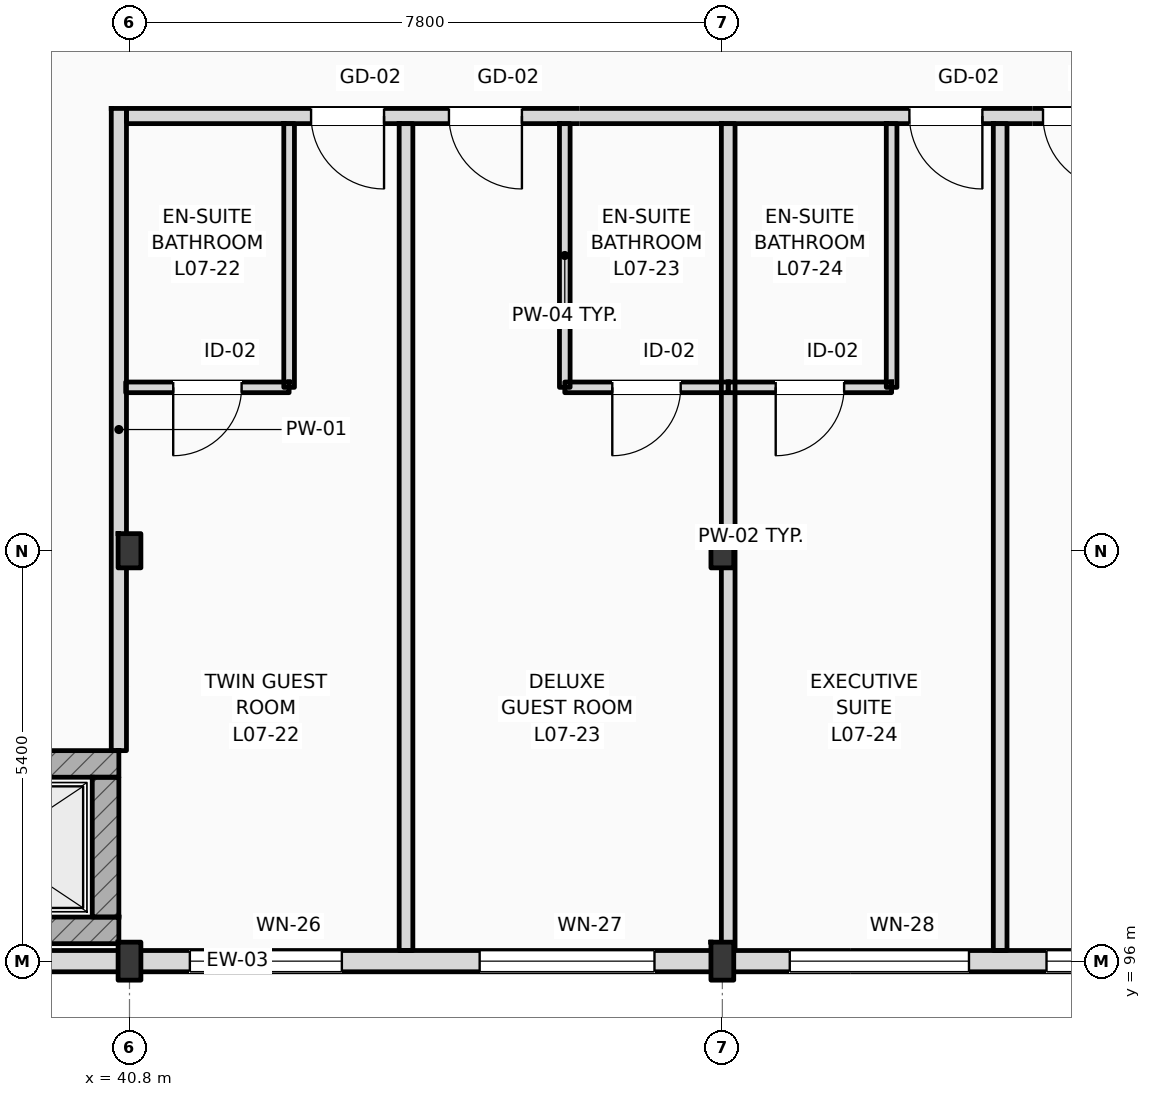
"""IFC4 building model, lengths in metres.
Left out: names, types, materials, properties, quantities, classifications, styles, units other than length and angle.
Written with IfcOpenShell. Run it as: python <this file> out.ifc"""

import sys

from ifc_helpers import new_model, si_unit, direction, frame, frame_2d, origin, origin_2d, place, context, subcontext, project, spatial, rectangle, i_section, extrude, element, fill, save


model = new_model("IFC4")
c1 = context("Model", 3, precision=1e-05, world=origin(), true_north=direction((0.0, 1.0)))
c2 = subcontext(c1, "Body", "Model", "MODEL_VIEW")
j1 = project(units=[si_unit("LENGTHUNIT", "METRE"), si_unit("PLANEANGLEUNIT", "RADIAN")], contexts=[c1])
p1 = place(None, origin())
s1 = spatial("IfcSite", under=j1, at=p1, CompositionType="ELEMENT")
p2 = place(p1, origin())
s2 = spatial("IfcBuilding", under=s1, at=p2, CompositionType="ELEMENT")
p3 = place(p2, frame((0.0, 0.0, 31.8)))
s3 = spatial("IfcBuildingStorey", under=s2, at=p3, CompositionType="ELEMENT", Elevation=31.8)
p4 = place(p3, frame((40.8, 96.0, 0.0), z_axis=(0.0, 0.0, 1.0), x_axis=(1.0, 0.0, 0.0)))
e1 = element("IfcColumn", 1, at=p4, inside=s3, PredefinedType="COLUMN", context=c2, shape_type="SweptSolid", body=[
    extrude(i_section(OverallWidth=0.3, OverallDepth=0.5, WebThickness=0.014, FlangeThickness=0.028, FilletRadius=0.027, at=origin_2d()), origin(), (0.0, 0.0, 1.0), 3.6),
])
p5 = place(p3, frame((40.8, 101.4, 0.0), z_axis=(0.0, 0.0, 1.0), x_axis=(1.0, 0.0, 0.0)))
e2 = element("IfcColumn", 2, at=p5, inside=s3, PredefinedType="COLUMN", context=c2, shape_type="SweptSolid", body=[
    extrude(i_section(OverallWidth=0.3, OverallDepth=0.45, WebThickness=0.014, FlangeThickness=0.026, FilletRadius=0.027, at=origin_2d()), origin(), (0.0, 0.0, 1.0), 3.6),
])
p6 = place(p3, frame((48.6, 96.0, 0.0), z_axis=(0.0, 0.0, 1.0), x_axis=(1.0, 0.0, 0.0)))
e3 = element("IfcColumn", 3, at=p6, inside=s3, PredefinedType="COLUMN", context=c2, shape_type="SweptSolid", body=[
    extrude(i_section(OverallWidth=0.3, OverallDepth=0.5, WebThickness=0.014, FlangeThickness=0.028, FilletRadius=0.027, at=origin_2d()), origin(), (0.0, 0.0, 1.0), 3.6),
])
p7 = place(p3, frame((48.6, 101.4, 0.0), z_axis=(0.0, 0.0, 1.0), x_axis=(1.0, 0.0, 0.0)))
e4 = element("IfcColumn", 4, at=p7, inside=s3, PredefinedType="COLUMN", context=c2, shape_type="SweptSolid", body=[
    extrude(i_section(OverallWidth=0.3, OverallDepth=0.45, WebThickness=0.014, FlangeThickness=0.026, FilletRadius=0.027, at=origin_2d()), origin(), (0.0, 0.0, 1.0), 3.6),
])
p8 = place(p3, frame((25.2, 96.0, 0.0), z_axis=(0.0, 0.0, 1.0), x_axis=(1.0, 0.0, 0.0)))
e5 = element("IfcWall", 5, at=p8, inside=s3, PredefinedType="STANDARD", context=c2, shape_type="SweptSolid", body=[
    extrude(rectangle(XDim=94.8, YDim=0.28, at=frame_2d((47.4, 0.0))), origin(), (0.0, 0.0, 1.0), 2.72),
])
p9 = place(p8, frame((16.394, 0.0, 0.9)))
e6 = element("IfcOpeningElement", 6, at=p9, cuts=e5, PredefinedType="OPENING", context=c2, shape_type="SweptSolid", body=[
    extrude(rectangle(XDim=2.0, YDim=1.64, at=frame_2d((1.0, 0.82))), frame((0.0, 0.15, 0.0), z_axis=(0.0, -1.0, 0.0), x_axis=(1.0, 0.0, 0.0)), (0.0, 0.0, 1.0), 0.3),
])
p10 = place(p8, frame((20.207, 0.0, 0.9)))
e7 = element("IfcOpeningElement", 7, at=p10, cuts=e5, PredefinedType="OPENING", context=c2, shape_type="SweptSolid", body=[
    extrude(rectangle(XDim=2.3, YDim=1.64, at=frame_2d((1.15, 0.82))), frame((0.0, 0.15, 0.0), z_axis=(0.0, -1.0, 0.0), x_axis=(1.0, 0.0, 0.0)), (0.0, 0.0, 1.0), 0.3),
])
p11 = place(p8, frame((24.287, 0.0, 0.9)))
e8 = element("IfcOpeningElement", 8, at=p11, cuts=e5, PredefinedType="OPENING", context=c2, shape_type="SweptSolid", body=[
    extrude(rectangle(XDim=2.358, YDim=1.64, at=frame_2d((1.179, 0.82))), frame((0.0, 0.15, 0.0), z_axis=(0.0, -1.0, 0.0), x_axis=(1.0, 0.0, 0.0)), (0.0, 0.0, 1.0), 0.3),
])
p12 = place(p8, frame((27.665, 0.0, 0.9)))
e9 = element("IfcOpeningElement", 9, at=p12, cuts=e5, PredefinedType="OPENING", context=c2, shape_type="SweptSolid", body=[
    extrude(rectangle(XDim=1.8, YDim=1.64, at=frame_2d((0.9, 0.82))), frame((0.0, 0.15, 0.0), z_axis=(0.0, -1.0, 0.0), x_axis=(1.0, 0.0, 0.0)), (0.0, 0.0, 1.0), 0.3),
])
p13 = place(p8, frame((32.103, 0.0, 0.9)))
e10 = element("IfcOpeningElement", 10, at=p13, cuts=e5, PredefinedType="OPENING", context=c2, shape_type="SweptSolid", body=[
    extrude(rectangle(XDim=2.359, YDim=1.64, at=frame_2d((1.179, 0.82))), frame((0.0, 0.15, 0.0), z_axis=(0.0, -1.0, 0.0), x_axis=(1.0, 0.0, 0.0)), (0.0, 0.0, 1.0), 0.3),
])
p14 = place(p8, frame((36.336, 0.0, 0.9)))
e11 = element("IfcOpeningElement", 11, at=p14, cuts=e5, PredefinedType="OPENING", context=c2, shape_type="SweptSolid", body=[
    extrude(rectangle(XDim=1.2, YDim=1.64, at=frame_2d((0.6, 0.82))), frame((0.0, 0.15, 0.0), z_axis=(0.0, -1.0, 0.0), x_axis=(1.0, 0.0, 0.0)), (0.0, 0.0, 1.0), 0.3),
])
p15 = place(p8, frame((56.177, 0.0, 0.9)))
e12 = element("IfcOpeningElement", 12, at=p15, cuts=e5, PredefinedType="OPENING", context=c2, shape_type="SweptSolid", body=[
    extrude(rectangle(XDim=1.35, YDim=1.64, at=frame_2d((0.675, 0.82))), frame((0.0, 0.15, 0.0), z_axis=(0.0, -1.0, 0.0), x_axis=(1.0, 0.0, 0.0)), (0.0, 0.0, 1.0), 0.3),
])
p16 = place(p8, frame((60.086, 0.0, 0.9)))
e13 = element("IfcOpeningElement", 13, at=p16, cuts=e5, PredefinedType="OPENING", context=c2, shape_type="SweptSolid", body=[
    extrude(rectangle(XDim=1.5, YDim=1.64, at=frame_2d((0.75, 0.82))), frame((0.0, 0.15, 0.0), z_axis=(0.0, -1.0, 0.0), x_axis=(1.0, 0.0, 0.0)), (0.0, 0.0, 1.0), 0.3),
])
p17 = place(p8, frame((64.838, 0.0, 0.9)))
e14 = element("IfcOpeningElement", 14, at=p17, cuts=e5, PredefinedType="OPENING", context=c2, shape_type="SweptSolid", body=[
    extrude(rectangle(XDim=1.65, YDim=1.64, at=frame_2d((0.825, 0.82))), frame((0.0, 0.15, 0.0), z_axis=(0.0, -1.0, 0.0), x_axis=(1.0, 0.0, 0.0)), (0.0, 0.0, 1.0), 0.3),
])
p18 = place(p8, frame((68.419, 0.0, 0.9)))
e15 = element("IfcOpeningElement", 15, at=p18, cuts=e5, PredefinedType="OPENING", context=c2, shape_type="SweptSolid", body=[
    extrude(rectangle(XDim=0.9, YDim=1.64, at=frame_2d((0.45, 0.82))), frame((0.0, 0.15, 0.0), z_axis=(0.0, -1.0, 0.0), x_axis=(1.0, 0.0, 0.0)), (0.0, 0.0, 1.0), 0.3),
])
p19 = place(p8, frame((73.544, 0.0, 0.9)))
e16 = element("IfcOpeningElement", 16, at=p19, cuts=e5, PredefinedType="OPENING", context=c2, shape_type="SweptSolid", body=[
    extrude(rectangle(XDim=1.95, YDim=1.64, at=frame_2d((0.975, 0.82))), frame((0.0, 0.15, 0.0), z_axis=(0.0, -1.0, 0.0), x_axis=(1.0, 0.0, 0.0)), (0.0, 0.0, 1.0), 0.3),
])
p20 = place(p8, frame((78.897, 0.0, 0.9)))
e17 = element("IfcOpeningElement", 17, at=p20, cuts=e5, PredefinedType="OPENING", context=c2, shape_type="SweptSolid", body=[
    extrude(rectangle(XDim=1.35, YDim=1.64, at=frame_2d((0.675, 0.82))), frame((0.0, 0.15, 0.0), z_axis=(0.0, -1.0, 0.0), x_axis=(1.0, 0.0, 0.0)), (0.0, 0.0, 1.0), 0.3),
])
p21 = place(p8, frame((82.249, 0.0, 0.9)))
e18 = element("IfcOpeningElement", 18, at=p21, cuts=e5, PredefinedType="OPENING", context=c2, shape_type="SweptSolid", body=[
    extrude(rectangle(XDim=2.25, YDim=1.64, at=frame_2d((1.125, 0.82))), frame((0.0, 0.15, 0.0), z_axis=(0.0, -1.0, 0.0), x_axis=(1.0, 0.0, 0.0)), (0.0, 0.0, 1.0), 0.3),
])
p22 = place(p8, frame((87.202, 0.0, 0.9)))
e19 = element("IfcOpeningElement", 19, at=p22, cuts=e5, PredefinedType="OPENING", context=c2, shape_type="SweptSolid", body=[
    extrude(rectangle(XDim=1.8, YDim=1.64, at=frame_2d((0.9, 0.82))), frame((0.0, 0.15, 0.0), z_axis=(0.0, -1.0, 0.0), x_axis=(1.0, 0.0, 0.0)), (0.0, 0.0, 1.0), 0.3),
])
p23 = place(p8, frame((90.867, 0.0, 0.9)))
e20 = element("IfcOpeningElement", 20, at=p23, cuts=e5, PredefinedType="OPENING", context=c2, shape_type="SweptSolid", body=[
    extrude(rectangle(XDim=2.55, YDim=1.64, at=frame_2d((1.275, 0.82))), frame((0.0, 0.15, 0.0), z_axis=(0.0, -1.0, 0.0), x_axis=(1.0, 0.0, 0.0)), (0.0, 0.0, 1.0), 0.3),
])
p24 = place(p3, frame((37.67, 98.595, 0.0), z_axis=(0.0, 0.0, 1.0), x_axis=(1.0, 0.0, 0.0)))
e21 = element("IfcWall", 21, at=p24, inside=s3, PredefinedType="SHEAR", context=c2, shape_type="SweptSolid", body=[
    extrude(rectangle(XDim=2.99, YDim=0.35, at=frame_2d((1.495, 0.0))), origin(), (0.0, 0.0, 1.0), 3.36),
])
p25 = place(p24, frame((0.695, 0.0, 0.0)))
e22 = element("IfcOpeningElement", 22, at=p25, cuts=e21, PredefinedType="OPENING", context=c2, shape_type="SweptSolid", body=[
    extrude(rectangle(XDim=1.25, YDim=2.25, at=frame_2d((0.625, 1.125))), frame((0.0, 0.185, 0.0), z_axis=(0.0, -1.0, 0.0), x_axis=(1.0, 0.0, 0.0)), (0.0, 0.0, 1.0), 0.37),
])
p26 = place(p3, frame((37.67, 96.405, 0.0), z_axis=(0.0, 0.0, 1.0), x_axis=(1.0, 0.0, 0.0)))
e23 = element("IfcWall", 23, at=p26, inside=s3, PredefinedType="SHEAR", context=c2, shape_type="SweptSolid", body=[
    extrude(rectangle(XDim=2.99, YDim=0.35, at=frame_2d((1.495, 0.0))), origin(), (0.0, 0.0, 1.0), 3.36),
])
p27 = place(p3, frame((40.485, 96.58, 0.0), z_axis=(0.0, 0.0, 1.0), x_axis=(0.0, 1.0, 0.0)))
e24 = element("IfcWall", 24, at=p27, inside=s3, PredefinedType="SHEAR", context=c2, shape_type="SweptSolid", body=[
    extrude(rectangle(XDim=1.84, YDim=0.35, at=frame_2d((0.92, 0.0))), origin(), (0.0, 0.0, 1.0), 2.99),
])
p28 = place(p3, frame((40.76, 107.12, 0.0), z_axis=(0.0, 0.0, 1.0), x_axis=(1.0, 0.0, 0.0)))
e25 = element("IfcWall", 25, at=p28, inside=s3, PredefinedType="PARTITIONING", context=c2, shape_type="SweptSolid", body=[
    extrude(rectangle(XDim=23.44, YDim=0.2, at=frame_2d((11.72, 0.0))), origin(), (0.0, 0.0, 1.0), 3.36),
])
p29 = place(p28, frame((2.429, 0.0, 0.0)))
e26 = element("IfcOpeningElement", 26, at=p29, cuts=e25, PredefinedType="OPENING", context=c2, shape_type="SweptSolid", body=[
    extrude(rectangle(XDim=0.96, YDim=2.2, at=frame_2d((0.48, 1.1))), frame((0.0, 0.11, 0.0), z_axis=(0.0, -1.0, 0.0), x_axis=(1.0, 0.0, 0.0)), (0.0, 0.0, 1.0), 0.22),
])
p30 = place(p28, frame((4.243, 0.0, 0.0)))
e27 = element("IfcOpeningElement", 27, at=p30, cuts=e25, PredefinedType="OPENING", context=c2, shape_type="SweptSolid", body=[
    extrude(rectangle(XDim=0.96, YDim=2.2, at=frame_2d((0.48, 1.1))), frame((0.0, 0.11, 0.0), z_axis=(0.0, -1.0, 0.0), x_axis=(1.0, 0.0, 0.0)), (0.0, 0.0, 1.0), 0.22),
])
p31 = place(p28, frame((10.301, 0.0, 0.0)))
e28 = element("IfcOpeningElement", 28, at=p31, cuts=e25, PredefinedType="OPENING", context=c2, shape_type="SweptSolid", body=[
    extrude(rectangle(XDim=0.96, YDim=2.2, at=frame_2d((0.48, 1.1))), frame((0.0, 0.11, 0.0), z_axis=(0.0, -1.0, 0.0), x_axis=(1.0, 0.0, 0.0)), (0.0, 0.0, 1.0), 0.22),
])
p32 = place(p28, frame((12.059, 0.0, 0.0)))
e29 = element("IfcOpeningElement", 29, at=p32, cuts=e25, PredefinedType="OPENING", context=c2, shape_type="SweptSolid", body=[
    extrude(rectangle(XDim=0.96, YDim=2.2, at=frame_2d((0.48, 1.1))), frame((0.0, 0.11, 0.0), z_axis=(0.0, -1.0, 0.0), x_axis=(1.0, 0.0, 0.0)), (0.0, 0.0, 1.0), 0.22),
])
p33 = place(p28, frame((18.118, 0.0, 0.0)))
e30 = element("IfcOpeningElement", 30, at=p33, cuts=e25, PredefinedType="OPENING", context=c2, shape_type="SweptSolid", body=[
    extrude(rectangle(XDim=0.96, YDim=2.2, at=frame_2d((0.48, 1.1))), frame((0.0, 0.11, 0.0), z_axis=(0.0, -1.0, 0.0), x_axis=(1.0, 0.0, 0.0)), (0.0, 0.0, 1.0), 0.22),
])
p34 = place(p28, frame((19.821, 0.0, 0.0)))
e31 = element("IfcOpeningElement", 31, at=p34, cuts=e25, PredefinedType="OPENING", context=c2, shape_type="SweptSolid", body=[
    extrude(rectangle(XDim=0.96, YDim=2.2, at=frame_2d((0.48, 1.1))), frame((0.0, 0.11, 0.0), z_axis=(0.0, -1.0, 0.0), x_axis=(1.0, 0.0, 0.0)), (0.0, 0.0, 1.0), 0.22),
])
p35 = place(p3, frame((40.66, 98.77, 0.0), z_axis=(0.0, 0.0, 1.0), x_axis=(0.0, 1.0, 0.0)))
e32 = element("IfcWall", 32, at=p35, inside=s3, PredefinedType="PARTITIONING", context=c2, shape_type="SweptSolid", body=[
    extrude(rectangle(XDim=8.45, YDim=0.2, at=frame_2d((4.225, 0.0))), origin(), (0.0, 0.0, 1.0), 2.99),
])
p36 = place(p3, frame((44.438, 96.14, 0.0), z_axis=(0.0, 0.0, 1.0), x_axis=(0.0, 1.0, 0.0)))
e33 = element("IfcWall", 33, at=p36, inside=s3, PredefinedType="PARTITIONING", context=c2, shape_type="SweptSolid", body=[
    extrude(rectangle(XDim=10.88, YDim=0.18, at=frame_2d((5.44, 0.0))), origin(), (0.0, 0.0, 1.0), 3.36),
])
p37 = place(p3, frame((42.9, 103.55, 0.0), z_axis=(0.0, 0.0, 1.0), x_axis=(0.0, 1.0, 0.0)))
e34 = element("IfcWall", 34, at=p37, inside=s3, PredefinedType="PARTITIONING", context=c2, shape_type="SweptSolid", body=[
    extrude(rectangle(XDim=3.47, YDim=0.14, at=frame_2d((1.735, 0.0))), origin(), (0.0, 0.0, 1.0), 3.36),
])
p38 = place(p3, frame((40.75, 103.55, 0.0), z_axis=(0.0, 0.0, 1.0), x_axis=(1.0, 0.0, 0.0)))
e35 = element("IfcWall", 35, at=p38, inside=s3, PredefinedType="PARTITIONING", context=c2, shape_type="SweptSolid", body=[
    extrude(rectangle(XDim=2.15, YDim=0.14, at=frame_2d((1.075, 0.0))), origin(), (0.0, 0.0, 1.0), 3.36),
])
p39 = place(p38, frame((0.625, 0.0, 0.0)))
e36 = element("IfcOpeningElement", 36, at=p39, cuts=e35, PredefinedType="OPENING", context=c2, shape_type="SweptSolid", body=[
    extrude(rectangle(XDim=0.9, YDim=2.1, at=frame_2d((0.45, 1.05))), frame((0.0, 0.08, 0.0), z_axis=(0.0, -1.0, 0.0), x_axis=(1.0, 0.0, 0.0)), (0.0, 0.0, 1.0), 0.16),
])
p40 = place(p3, frame((48.677, 96.14, 0.0), z_axis=(0.0, 0.0, 1.0), x_axis=(0.0, 1.0, 0.0)))
e37 = element("IfcWall", 37, at=p40, inside=s3, PredefinedType="PARTITIONING", context=c2, shape_type="SweptSolid", body=[
    extrude(rectangle(XDim=10.88, YDim=0.18, at=frame_2d((5.44, 0.0))), origin(), (0.0, 0.0, 1.0), 2.99),
])
p41 = place(p3, frame((46.527, 103.55, 0.0), z_axis=(0.0, 0.0, 1.0), x_axis=(0.0, 1.0, 0.0)))
e38 = element("IfcWall", 38, at=p41, inside=s3, PredefinedType="PARTITIONING", context=c2, shape_type="SweptSolid", body=[
    extrude(rectangle(XDim=3.47, YDim=0.14, at=frame_2d((1.735, 0.0))), origin(), (0.0, 0.0, 1.0), 3.36),
])
p42 = place(p3, frame((46.527, 103.55, 0.0), z_axis=(0.0, 0.0, 1.0), x_axis=(1.0, 0.0, 0.0)))
e39 = element("IfcWall", 39, at=p42, inside=s3, PredefinedType="PARTITIONING", context=c2, shape_type="SweptSolid", body=[
    extrude(rectangle(XDim=2.15, YDim=0.14, at=frame_2d((1.075, 0.0))), origin(), (0.0, 0.0, 1.0), 3.36),
])
p43 = place(p42, frame((0.625, 0.0, 0.0)))
e40 = element("IfcOpeningElement", 40, at=p43, cuts=e39, PredefinedType="OPENING", context=c2, shape_type="SweptSolid", body=[
    extrude(rectangle(XDim=0.9, YDim=2.1, at=frame_2d((0.45, 1.05))), frame((0.0, 0.08, 0.0), z_axis=(0.0, -1.0, 0.0), x_axis=(1.0, 0.0, 0.0)), (0.0, 0.0, 1.0), 0.16),
])
p44 = place(p3, frame((52.255, 96.14, 0.0), z_axis=(0.0, 0.0, 1.0), x_axis=(0.0, 1.0, 0.0)))
e41 = element("IfcWall", 41, at=p44, inside=s3, PredefinedType="PARTITIONING", context=c2, shape_type="SweptSolid", body=[
    extrude(rectangle(XDim=10.88, YDim=0.18, at=frame_2d((5.44, 0.0))), origin(), (0.0, 0.0, 1.0), 3.36),
])
p45 = place(p3, frame((50.827, 103.55, 0.0), z_axis=(0.0, 0.0, 1.0), x_axis=(0.0, 1.0, 0.0)))
e42 = element("IfcWall", 42, at=p45, inside=s3, PredefinedType="PARTITIONING", context=c2, shape_type="SweptSolid", body=[
    extrude(rectangle(XDim=3.47, YDim=0.14, at=frame_2d((1.735, 0.0))), origin(), (0.0, 0.0, 1.0), 3.36),
])
p46 = place(p3, frame((48.677, 103.55, 0.0), z_axis=(0.0, 0.0, 1.0), x_axis=(1.0, 0.0, 0.0)))
e43 = element("IfcWall", 43, at=p46, inside=s3, PredefinedType="PARTITIONING", context=c2, shape_type="SweptSolid", body=[
    extrude(rectangle(XDim=2.15, YDim=0.14, at=frame_2d((1.075, 0.0))), origin(), (0.0, 0.0, 1.0), 3.36),
])
p47 = place(p46, frame((0.625, 0.0, 0.0)))
e44 = element("IfcOpeningElement", 44, at=p47, cuts=e43, PredefinedType="OPENING", context=c2, shape_type="SweptSolid", body=[
    extrude(rectangle(XDim=0.9, YDim=2.1, at=frame_2d((0.45, 1.05))), frame((0.0, 0.08, 0.0), z_axis=(0.0, -1.0, 0.0), x_axis=(1.0, 0.0, 0.0)), (0.0, 0.0, 1.0), 0.16),
])
p48 = place(p9, origin())
e45 = element("IfcWindow", 45, at=p48, inside=s3, PartitioningType="DOUBLE_PANEL_VERTICAL", PredefinedType="WINDOW", context=c2, shape_type="SweptSolid", body=[
    extrude(rectangle(XDim=2.0, YDim=1.64, at=frame_2d((1.0, 0.82))), frame((0.0, 0.03, 0.0), z_axis=(0.0, -1.0, 0.0), x_axis=(1.0, 0.0, 0.0)), (0.0, 0.0, 1.0), 0.06),
])
fill(e6, e45)
p49 = place(p10, origin())
e46 = element("IfcWindow", 46, at=p49, inside=s3, PartitioningType="DOUBLE_PANEL_VERTICAL", PredefinedType="WINDOW", context=c2, shape_type="SweptSolid", body=[
    extrude(rectangle(XDim=2.3, YDim=1.64, at=frame_2d((1.15, 0.82))), frame((0.0, 0.03, 0.0), z_axis=(0.0, -1.0, 0.0), x_axis=(1.0, 0.0, 0.0)), (0.0, 0.0, 1.0), 0.06),
])
fill(e7, e46)
p50 = place(p11, origin())
e47 = element("IfcWindow", 47, at=p50, inside=s3, PartitioningType="DOUBLE_PANEL_VERTICAL", PredefinedType="WINDOW", context=c2, shape_type="SweptSolid", body=[
    extrude(rectangle(XDim=2.358, YDim=1.64, at=frame_2d((1.179, 0.82))), frame((0.0, 0.03, 0.0), z_axis=(0.0, -1.0, 0.0), x_axis=(1.0, 0.0, 0.0)), (0.0, 0.0, 1.0), 0.06),
])
fill(e8, e47)
p51 = place(p12, origin())
e48 = element("IfcWindow", 48, at=p51, inside=s3, PartitioningType="DOUBLE_PANEL_VERTICAL", PredefinedType="WINDOW", context=c2, shape_type="SweptSolid", body=[
    extrude(rectangle(XDim=1.8, YDim=1.64, at=frame_2d((0.9, 0.82))), frame((0.0, 0.03, 0.0), z_axis=(0.0, -1.0, 0.0), x_axis=(1.0, 0.0, 0.0)), (0.0, 0.0, 1.0), 0.06),
])
fill(e9, e48)
p52 = place(p29, frame((0.96, 0.0, 0.0), z_axis=(0.0, 0.0, 1.0), x_axis=(-1.0, 0.0, 0.0)))
e49 = element("IfcDoor", 49, at=p52, inside=s3, OperationType="SINGLE_SWING_RIGHT", PredefinedType="DOOR", context=c2, shape_type="SweptSolid", body=[
    extrude(rectangle(XDim=0.96, YDim=2.2, at=frame_2d((0.48, 1.1))), frame((0.0, 0.025, 0.0), z_axis=(0.0, -1.0, 0.0), x_axis=(1.0, 0.0, 0.0)), (0.0, 0.0, 1.0), 0.05),
])
fill(e26, e49)
p53 = place(p39, frame((0.9, 0.0, 0.0), z_axis=(0.0, 0.0, 1.0), x_axis=(-1.0, 0.0, 0.0)))
e50 = element("IfcDoor", 50, at=p53, inside=s3, OperationType="SINGLE_SWING_LEFT", PredefinedType="DOOR", context=c2, shape_type="SweptSolid", body=[
    extrude(rectangle(XDim=0.9, YDim=2.1, at=frame_2d((0.45, 1.05))), frame((0.0, 0.025, 0.0), z_axis=(0.0, -1.0, 0.0), x_axis=(1.0, 0.0, 0.0)), (0.0, 0.0, 1.0), 0.05),
])
fill(e36, e50)
p54 = place(p30, frame((0.96, 0.0, 0.0), z_axis=(0.0, 0.0, 1.0), x_axis=(-1.0, 0.0, 0.0)))
e51 = element("IfcDoor", 51, at=p54, inside=s3, OperationType="SINGLE_SWING_RIGHT", PredefinedType="DOOR", context=c2, shape_type="SweptSolid", body=[
    extrude(rectangle(XDim=0.96, YDim=2.2, at=frame_2d((0.48, 1.1))), frame((0.0, 0.025, 0.0), z_axis=(0.0, -1.0, 0.0), x_axis=(1.0, 0.0, 0.0)), (0.0, 0.0, 1.0), 0.05),
])
fill(e27, e51)
p55 = place(p43, frame((0.9, 0.0, 0.0), z_axis=(0.0, 0.0, 1.0), x_axis=(-1.0, 0.0, 0.0)))
e52 = element("IfcDoor", 52, at=p55, inside=s3, OperationType="SINGLE_SWING_LEFT", PredefinedType="DOOR", context=c2, shape_type="SweptSolid", body=[
    extrude(rectangle(XDim=0.9, YDim=2.1, at=frame_2d((0.45, 1.05))), frame((0.0, 0.025, 0.0), z_axis=(0.0, -1.0, 0.0), x_axis=(1.0, 0.0, 0.0)), (0.0, 0.0, 1.0), 0.05),
])
fill(e40, e52)
p56 = place(p31, frame((0.96, 0.0, 0.0), z_axis=(0.0, 0.0, 1.0), x_axis=(-1.0, 0.0, 0.0)))
e53 = element("IfcDoor", 53, at=p56, inside=s3, OperationType="SINGLE_SWING_RIGHT", PredefinedType="DOOR", context=c2, shape_type="SweptSolid", body=[
    extrude(rectangle(XDim=0.96, YDim=2.2, at=frame_2d((0.48, 1.1))), frame((0.0, 0.025, 0.0), z_axis=(0.0, -1.0, 0.0), x_axis=(1.0, 0.0, 0.0)), (0.0, 0.0, 1.0), 0.05),
])
fill(e28, e53)
p57 = place(p47, frame((0.9, 0.0, 0.0), z_axis=(0.0, 0.0, 1.0), x_axis=(-1.0, 0.0, 0.0)))
e54 = element("IfcDoor", 54, at=p57, inside=s3, OperationType="SINGLE_SWING_LEFT", PredefinedType="DOOR", context=c2, shape_type="SweptSolid", body=[
    extrude(rectangle(XDim=0.9, YDim=2.1, at=frame_2d((0.45, 1.05))), frame((0.0, 0.025, 0.0), z_axis=(0.0, -1.0, 0.0), x_axis=(1.0, 0.0, 0.0)), (0.0, 0.0, 1.0), 0.05),
])
fill(e44, e54)
p58 = place(p32, frame((0.96, 0.0, 0.0), z_axis=(0.0, 0.0, 1.0), x_axis=(-1.0, 0.0, 0.0)))
e55 = element("IfcDoor", 55, at=p58, inside=s3, OperationType="SINGLE_SWING_RIGHT", PredefinedType="DOOR", context=c2, shape_type="SweptSolid", body=[
    extrude(rectangle(XDim=0.96, YDim=2.2, at=frame_2d((0.48, 1.1))), frame((0.0, 0.025, 0.0), z_axis=(0.0, -1.0, 0.0), x_axis=(1.0, 0.0, 0.0)), (0.0, 0.0, 1.0), 0.05),
])
fill(e29, e55)
save(model, sys.argv[1])
